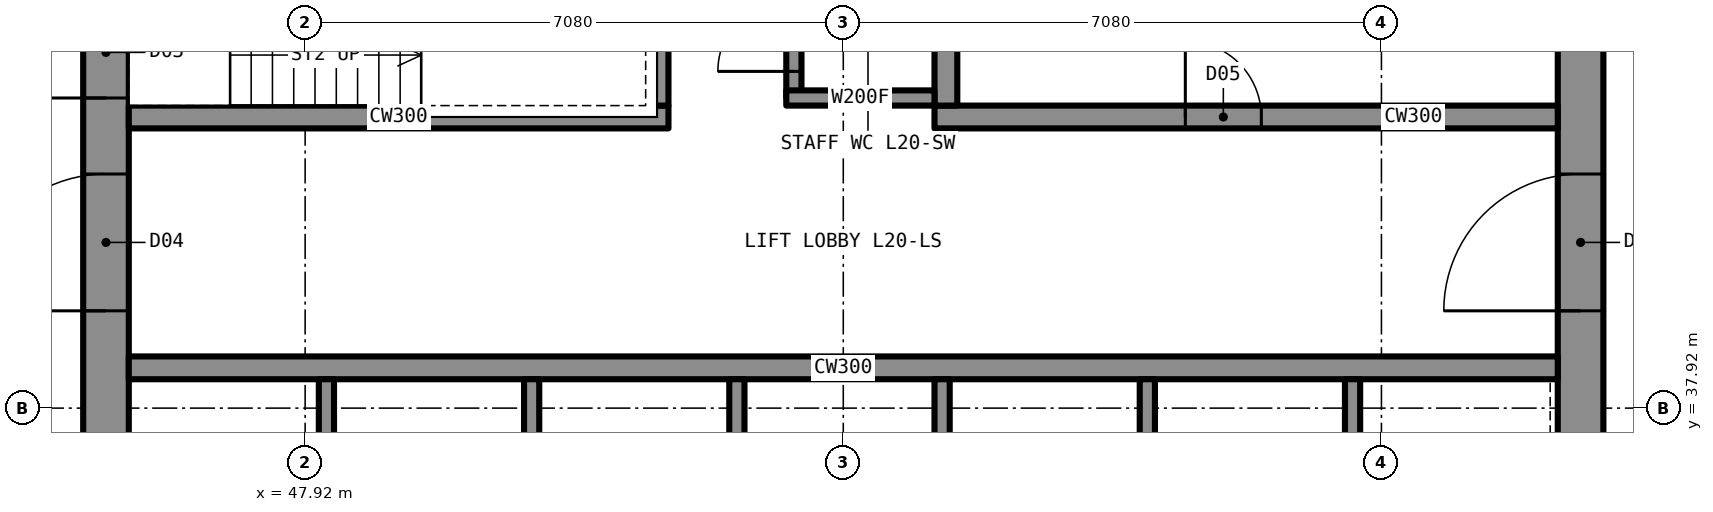
"""IFC4 building model, lengths in metres.
Left out: names, types, materials, properties, quantities, classifications, styles, units other than length and angle.
Written with IfcOpenShell. Run it as: python <this file> out.ifc"""

import sys

from ifc_helpers import new_model, si_unit, direction, frame, frame_2d, origin, place, context, subcontext, project, spatial, rectangle, extrude, element, fill, save


model = new_model("IFC4")
c1 = context("Model", 3, precision=1e-05, world=origin(), true_north=direction((0.0, 1.0)))
c2 = subcontext(c1, "Body", "Model", "MODEL_VIEW")
j1 = project(units=[si_unit("LENGTHUNIT", "METRE"), si_unit("PLANEANGLEUNIT", "RADIAN")], contexts=[c1])
p1 = place(None, origin())
s1 = spatial("IfcSite", under=j1, at=p1, CompositionType="ELEMENT")
p2 = place(p1, origin())
s2 = spatial("IfcBuilding", under=s1, at=p2, CompositionType="ELEMENT")
p3 = place(p2, frame((0.0, 0.0, 70.5)))
s3 = spatial("IfcBuildingStorey", under=s2, at=p3, CompositionType="ELEMENT", Elevation=70.5)
p4 = place(p3, frame((64.7, 35.6, 0.0), z_axis=(0.0, 0.0, 1.0), x_axis=(0.0, 1.0, 0.0)))
e1 = element("IfcWall", 1, at=p4, inside=s3, PredefinedType="SHEAR", context=c2, shape_type="SweptSolid", body=[
    extrude(rectangle(XDim=18.8, YDim=0.6, at=frame_2d((9.4, 0.0))), origin(), (0.0, 0.0, 1.0), 3.5),
])
p5 = place(p4, frame((13.4, 0.0, 0.0)))
e2 = element("IfcOpeningElement", 2, at=p5, cuts=e1, PredefinedType="OPENING", context=c2, shape_type="SweptSolid", body=[
    extrude(rectangle(XDim=1.8, YDim=2.2, at=frame_2d((0.9, 1.1))), frame((0.0, 0.31, 0.0), z_axis=(0.0, -1.0, 0.0), x_axis=(1.0, 0.0, 0.0)), (0.0, 0.0, 1.0), 0.62),
])
p6 = place(p4, frame((3.6, 0.0, 0.0)))
e3 = element("IfcOpeningElement", 3, at=p6, cuts=e1, PredefinedType="OPENING", context=c2, shape_type="SweptSolid", body=[
    extrude(rectangle(XDim=1.8, YDim=2.2, at=frame_2d((0.9, 1.1))), frame((0.0, 0.31, 0.0), z_axis=(0.0, -1.0, 0.0), x_axis=(1.0, 0.0, 0.0)), (0.0, 0.0, 1.0), 0.62),
])
p7 = place(p3, frame((45.3, 35.6, 0.0), z_axis=(0.0, 0.0, 1.0), x_axis=(0.0, 1.0, 0.0)))
e4 = element("IfcWall", 4, at=p7, inside=s3, PredefinedType="SHEAR", context=c2, shape_type="SweptSolid", body=[
    extrude(rectangle(XDim=18.8, YDim=0.6, at=frame_2d((9.4, 0.0))), origin(), (0.0, 0.0, 1.0), 3.5),
])
p8 = place(p7, frame((13.4, 0.0, 0.0)))
e5 = element("IfcOpeningElement", 5, at=p8, cuts=e4, PredefinedType="OPENING", context=c2, shape_type="SweptSolid", body=[
    extrude(rectangle(XDim=1.8, YDim=2.2, at=frame_2d((0.9, 1.1))), frame((0.0, 0.31, 0.0), z_axis=(0.0, -1.0, 0.0), x_axis=(1.0, 0.0, 0.0)), (0.0, 0.0, 1.0), 0.62),
])
p9 = place(p7, frame((3.6, 0.0, 0.0)))
e6 = element("IfcOpeningElement", 6, at=p9, cuts=e4, PredefinedType="OPENING", context=c2, shape_type="SweptSolid", body=[
    extrude(rectangle(XDim=1.8, YDim=2.2, at=frame_2d((0.9, 1.1))), frame((0.0, 0.31, 0.0), z_axis=(0.0, -1.0, 0.0), x_axis=(1.0, 0.0, 0.0)), (0.0, 0.0, 1.0), 0.62),
])
p10 = place(p7, frame((6.4, 0.0, 0.0)))
e7 = element("IfcOpeningElement", 7, at=p10, cuts=e4, PredefinedType="OPENING", context=c2, shape_type="SweptSolid", body=[
    extrude(rectangle(XDim=1.2, YDim=2.2, at=frame_2d((0.6, 1.1))), frame((0.0, 0.31, 0.0), z_axis=(0.0, -1.0, 0.0), x_axis=(1.0, 0.0, 0.0)), (0.0, 0.0, 1.0), 0.62),
])
p11 = place(p3, frame((45.6, 38.45, 0.0), z_axis=(0.0, 0.0, 1.0), x_axis=(1.0, 0.0, 0.0)))
e8 = element("IfcWall", 8, at=p11, inside=s3, PredefinedType="SHEAR", context=c2, shape_type="SweptSolid", body=[
    extrude(rectangle(XDim=18.8, YDim=0.3, at=frame_2d((9.4, 0.0))), origin(), (0.0, 0.0, 1.0), 3.5),
])
p12 = place(p3, frame((45.6, 41.75, 0.0), z_axis=(0.0, 0.0, 1.0), x_axis=(1.0, 0.0, 0.0)))
e9 = element("IfcWall", 9, at=p12, inside=s3, PredefinedType="SHEAR", context=c2, shape_type="SweptSolid", body=[
    extrude(rectangle(XDim=7.1, YDim=0.3, at=frame_2d((3.55, 0.0))), origin(), (0.0, 0.0, 1.0), 3.5),
])
p13 = place(p3, frame((56.2, 41.75, 0.0), z_axis=(0.0, 0.0, 1.0), x_axis=(1.0, 0.0, 0.0)))
e10 = element("IfcWall", 10, at=p13, inside=s3, PredefinedType="SHEAR", context=c2, shape_type="SweptSolid", body=[
    extrude(rectangle(XDim=8.2, YDim=0.3, at=frame_2d((4.1, 0.0))), origin(), (0.0, 0.0, 1.0), 3.5),
])
p14 = place(p13, frame((3.3, 0.0, 0.0)))
e11 = element("IfcOpeningElement", 11, at=p14, cuts=e10, PredefinedType="OPENING", context=c2, shape_type="SweptSolid", body=[
    extrude(rectangle(XDim=1.0, YDim=2.1, at=frame_2d((0.5, 1.05))), frame((0.0, 0.16, 0.0), z_axis=(0.0, -1.0, 0.0), x_axis=(1.0, 0.0, 0.0)), (0.0, 0.0, 1.0), 0.32),
])
p15 = place(p3, frame((52.55, 41.9, 0.0), z_axis=(0.0, 0.0, 1.0), x_axis=(0.0, 1.0, 0.0)))
e12 = element("IfcWall", 12, at=p15, inside=s3, PredefinedType="SHEAR", context=c2, shape_type="SweptSolid", body=[
    extrude(rectangle(XDim=6.2, YDim=0.3, at=frame_2d((3.1, 0.0))), origin(), (0.0, 0.0, 1.0), 3.5),
])
p16 = place(p15, frame((4.125, 0.0, 0.0)))
e13 = element("IfcOpeningElement", 13, at=p16, cuts=e12, PredefinedType="OPENING", context=c2, shape_type="SweptSolid", body=[
    extrude(rectangle(XDim=1.2, YDim=2.2, at=frame_2d((0.6, 1.1))), frame((0.0, 0.16, 0.0), z_axis=(0.0, -1.0, 0.0), x_axis=(1.0, 0.0, 0.0)), (0.0, 0.0, 1.0), 0.32),
])
p17 = place(p3, frame((56.35, 41.9, 0.0), z_axis=(0.0, 0.0, 1.0), x_axis=(0.0, 1.0, 0.0)))
e14 = element("IfcWall", 14, at=p17, inside=s3, PredefinedType="SHEAR", context=c2, shape_type="SweptSolid", body=[
    extrude(rectangle(XDim=9.5, YDim=0.3, at=frame_2d((4.75, 0.0))), origin(), (0.0, 0.0, 1.0), 3.5),
])
p18 = place(p17, frame((7.1, 0.0, 0.0)))
e15 = element("IfcOpeningElement", 15, at=p18, cuts=e14, PredefinedType="OPENING", context=c2, shape_type="SweptSolid", body=[
    extrude(rectangle(XDim=1.8, YDim=2.2, at=frame_2d((0.9, 1.1))), frame((0.0, 0.16, 0.0), z_axis=(0.0, -1.0, 0.0), x_axis=(1.0, 0.0, 0.0)), (0.0, 0.0, 1.0), 0.32),
])
p19 = place(p3, frame((54.35, 42.0, 0.0), z_axis=(0.0, 0.0, 1.0), x_axis=(0.0, 1.0, 0.0)))
e16 = element("IfcWall", 16, at=p19, inside=s3, PredefinedType="PARTITIONING", context=c2, shape_type="SweptSolid", body=[
    extrude(rectangle(XDim=1.5, YDim=0.2, at=frame_2d((0.75, 0.0))), origin(), (0.0, 0.0, 1.0), 3.33),
])
p20 = place(p19, frame((0.25, 0.0, 0.0)))
e17 = element("IfcOpeningElement", 17, at=p20, cuts=e16, PredefinedType="OPENING", context=c2, shape_type="SweptSolid", body=[
    extrude(rectangle(XDim=1.0, YDim=2.1, at=frame_2d((0.5, 1.05))), frame((0.0, 0.11, 0.0), z_axis=(0.0, -1.0, 0.0), x_axis=(1.0, 0.0, 0.0)), (0.0, 0.0, 1.0), 0.22),
])
p21 = place(p3, frame((54.25, 42.0, 0.0), z_axis=(0.0, 0.0, 1.0), x_axis=(1.0, 0.0, 0.0)))
e18 = element("IfcWall", 18, at=p21, inside=s3, PredefinedType="PARTITIONING", context=c2, shape_type="SweptSolid", body=[
    extrude(rectangle(XDim=1.95, YDim=0.2, at=frame_2d((0.975, 0.0))), origin(), (0.0, 0.0, 1.0), 3.33),
])
for number, where, z_axis, x_axis in (
    (19, (48.2, 35.6, 0.0), (0.0, 0.0, 1.0), (0.0, 1.0, 0.0)),
    (20, (50.9, 35.6, 0.0), (0.0, 0.0, 1.0), (0.0, 1.0, 0.0)),
    (21, (53.6, 35.6, 0.0), (0.0, 0.0, 1.0), (0.0, 1.0, 0.0)),
    (22, (56.3, 35.6, 0.0), (0.0, 0.0, 1.0), (0.0, 1.0, 0.0)),
    (23, (59.0, 35.6, 0.0), (0.0, 0.0, 1.0), (0.0, 1.0, 0.0)),
    (24, (61.7, 35.6, 0.0), (0.0, 0.0, 1.0), (0.0, 1.0, 0.0)),
):
    element("IfcWall", number, at=place(p3, frame(where, z_axis=z_axis, x_axis=x_axis)), inside=s3, PredefinedType="PARTITIONING", context=c2, shape_type="SweptSolid", body=[
        extrude(rectangle(XDim=2.7, YDim=0.2, at=frame_2d((1.35, 0.0))), origin(), (0.0, 0.0, 1.0), 3.33),
    ])
p22 = place(p20, origin())
e25 = element("IfcDoor", 25, at=p22, inside=s3, OperationType="SINGLE_SWING_LEFT", PredefinedType="DOOR", context=c2, shape_type="SweptSolid", body=[
    extrude(rectangle(XDim=1.0, YDim=2.1, at=frame_2d((0.5, 1.05))), frame((0.0, 0.025, 0.0), z_axis=(0.0, -1.0, 0.0), x_axis=(1.0, 0.0, 0.0)), (0.0, 0.0, 1.0), 0.05),
])
fill(e17, e25)
p23 = place(p9, origin())
e26 = element("IfcDoor", 26, at=p23, inside=s3, OperationType="DOUBLE_DOOR_SINGLE_SWING", PredefinedType="DOOR", context=c2, shape_type="SweptSolid", body=[
    extrude(rectangle(XDim=1.8, YDim=2.2, at=frame_2d((0.9, 1.1))), frame((0.0, 0.025, 0.0), z_axis=(0.0, -1.0, 0.0), x_axis=(1.0, 0.0, 0.0)), (0.0, 0.0, 1.0), 0.05),
])
fill(e6, e26)
p24 = place(p6, origin())
e27 = element("IfcDoor", 27, at=p24, inside=s3, OperationType="DOUBLE_DOOR_SINGLE_SWING", PredefinedType="DOOR", context=c2, shape_type="SweptSolid", body=[
    extrude(rectangle(XDim=1.8, YDim=2.2, at=frame_2d((0.9, 1.1))), frame((0.0, 0.025, 0.0), z_axis=(0.0, -1.0, 0.0), x_axis=(1.0, 0.0, 0.0)), (0.0, 0.0, 1.0), 0.05),
])
fill(e3, e27)
p25 = place(p10, origin())
e28 = element("IfcDoor", 28, at=p25, inside=s3, OperationType="SINGLE_SWING_LEFT", PredefinedType="DOOR", context=c2, shape_type="SweptSolid", body=[
    extrude(rectangle(XDim=1.2, YDim=2.2, at=frame_2d((0.6, 1.1))), frame((0.0, 0.025, 0.0), z_axis=(0.0, -1.0, 0.0), x_axis=(1.0, 0.0, 0.0)), (0.0, 0.0, 1.0), 0.05),
])
fill(e7, e28)
p26 = place(p14, origin())
e29 = element("IfcDoor", 29, at=p26, inside=s3, OperationType="SINGLE_SWING_LEFT", PredefinedType="DOOR", context=c2, shape_type="SweptSolid", body=[
    extrude(rectangle(XDim=1.0, YDim=2.1, at=frame_2d((0.5, 1.05))), frame((0.0, 0.025, 0.0), z_axis=(0.0, -1.0, 0.0), x_axis=(1.0, 0.0, 0.0)), (0.0, 0.0, 1.0), 0.05),
])
fill(e11, e29)
save(model, sys.argv[1])
